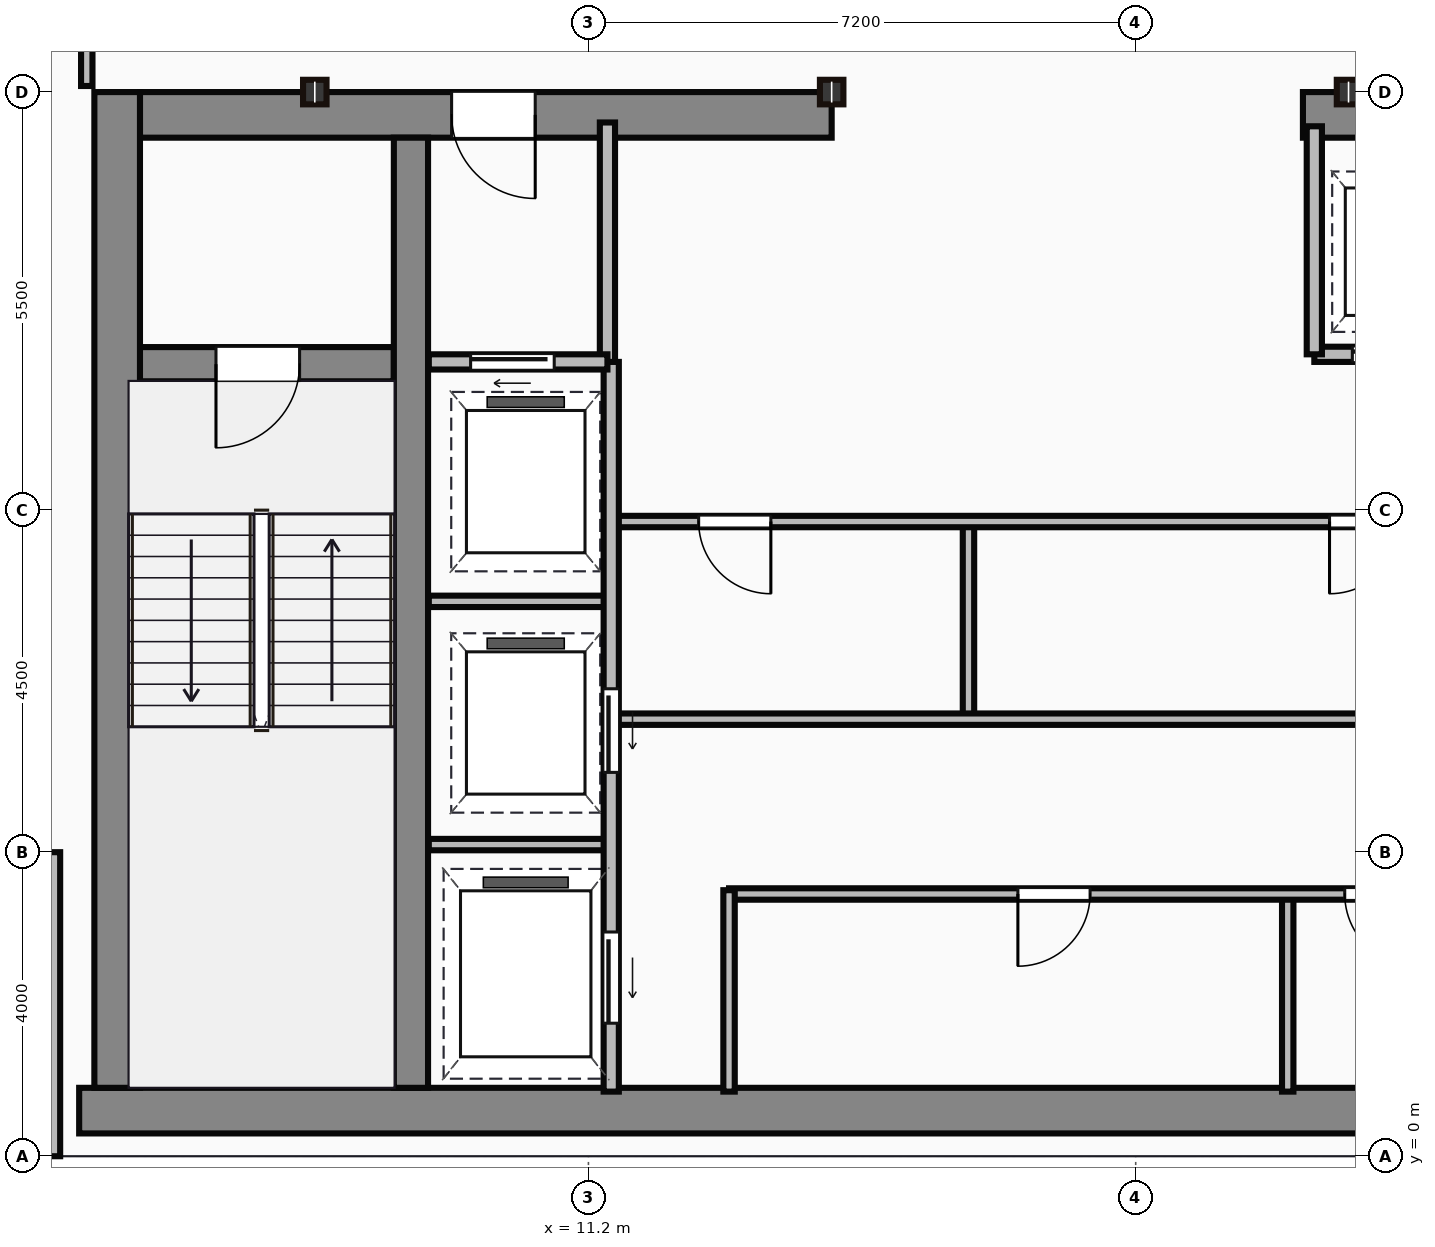
"""IFC4 building model, lengths in metres.
Left out: names, types, materials, properties, quantities, classifications, styles, units other than length and angle.
Written with IfcOpenShell. Run it as: python <this file> out.ifc"""

import sys

from ifc_helpers import new_model, si_unit, direction, frame, frame_2d, origin, origin_2d, place, context, subcontext, project, spatial, rectangle, i_section, extrude, source, transform, mapped, element, fill, save


model = new_model("IFC4")
c1 = context("Model", 3, precision=1e-05, world=origin(), true_north=direction((0.0, 1.0)))
c2 = subcontext(c1, "Body", "Model", "MODEL_VIEW")
j1 = project(units=[si_unit("LENGTHUNIT", "METRE"), si_unit("PLANEANGLEUNIT", "RADIAN")], contexts=[c1])
p1 = place(None, origin())
s1 = spatial("IfcSite", under=j1, at=p1, CompositionType="ELEMENT")
p2 = place(p1, origin())
s2 = spatial("IfcBuilding", under=s1, at=p2, CompositionType="ELEMENT")
p3 = place(p2, frame((0.0, 0.0, 228.75)))
s3 = spatial("IfcBuildingStorey", under=s2, at=p3, CompositionType="ELEMENT", Elevation=228.75)
m1 = source(origin(), c2, "Body", "SweptSolid", [
    extrude(rectangle(XDim=29.5, YDim=0.6, at=frame_2d((14.75, 0.0))), origin(), (0.0, 0.0, 1.0), 3.65),
])
p4 = place(p3, frame((4.5, 0.6, 0.0), z_axis=(0.0, 0.0, 1.0), x_axis=(1.0, 0.0, 0.0)))
e1 = element("IfcWall", 1, at=p4, inside=s3, PredefinedType="SHEAR", context=c2, shape_type="MappedRepresentation", body=[
    mapped(m1, transform((0.0, 0.0, 0.0))),
])
m2 = source(origin(), c2, "Body", "SweptSolid", [
    extrude(rectangle(XDim=13.1, YDim=0.6, at=frame_2d((6.55, 0.0))), origin(), (0.0, 0.0, 1.0), 3.65),
])
p5 = place(p3, frame((5.0, 0.9, 0.0), z_axis=(0.0, 0.0, 1.0), x_axis=(0.0, 1.0, 0.0)))
e2 = element("IfcWall", 2, at=p5, inside=s3, PredefinedType="SHEAR", context=c2, shape_type="MappedRepresentation", body=[
    mapped(m2, transform((0.0, 0.0, 0.0))),
])
m3 = source(origin(), c2, "Body", "SweptSolid", [
    extrude(rectangle(XDim=9.1, YDim=0.6, at=frame_2d((4.55, 0.0))), origin(), (0.0, 0.0, 1.0), 3.65),
])
p6 = place(p3, frame((5.3, 13.7, 0.0), z_axis=(0.0, 0.0, 1.0), x_axis=(1.0, 0.0, 0.0)))
e3 = element("IfcWall", 3, at=p6, inside=s3, PredefinedType="SHEAR", context=c2, shape_type="MappedRepresentation", body=[
    mapped(m3, transform((0.0, 0.0, 0.0))),
])
p7 = place(p6, frame((4.1, 0.0, 0.0)))
e4 = element("IfcOpeningElement", 4, at=p7, cuts=e3, PredefinedType="OPENING", context=c2, shape_type="SweptSolid", body=[
    extrude(rectangle(XDim=1.1, YDim=2.15, at=frame_2d((0.55, 1.075))), frame((0.0, 0.31, 0.0), z_axis=(0.0, -1.0, 0.0), x_axis=(1.0, 0.0, 0.0)), (0.0, 0.0, 1.0), 0.62),
])
m4 = source(origin(), c2, "Body", "SweptSolid", [
    extrude(rectangle(XDim=12.6, YDim=0.6, at=frame_2d((6.3, 0.0))), origin(), (0.0, 0.0, 1.0), 3.65),
])
p8 = place(p3, frame((20.6, 13.7, 0.0), z_axis=(0.0, 0.0, 1.0), x_axis=(1.0, 0.0, 0.0)))
e5 = element("IfcWall", 5, at=p8, inside=s3, PredefinedType="SHEAR", context=c2, shape_type="MappedRepresentation", body=[
    mapped(m4, transform((0.0, 0.0, 0.0))),
])
p9 = place(p8, frame((9.25, 0.0, 0.0)))
e6 = element("IfcOpeningElement", 6, at=p9, cuts=e5, PredefinedType="OPENING", context=c2, shape_type="SweptSolid", body=[
    extrude(rectangle(XDim=1.1, YDim=2.15, at=frame_2d((0.55, 1.075))), frame((0.0, 0.31, 0.0), z_axis=(0.0, -1.0, 0.0), x_axis=(1.0, 0.0, 0.0)), (0.0, 0.0, 1.0), 0.62),
])
m5 = source(origin(), c2, "Body", "SweptSolid", [
    extrude(rectangle(XDim=12.5, YDim=0.45, at=frame_2d((6.25, 0.0))), origin(), (0.0, 0.0, 1.0), 3.65),
])
p10 = place(p3, frame((8.865, 0.9, 0.0), z_axis=(0.0, 0.0, 1.0), x_axis=(0.0, 1.0, 0.0)))
e7 = element("IfcWall", 7, at=p10, inside=s3, PredefinedType="SHEAR", context=c2, shape_type="MappedRepresentation", body=[
    mapped(m5, transform((0.0, 0.0, 0.0))),
])
m6 = source(origin(), c2, "Body", "SweptSolid", [
    extrude(rectangle(XDim=3.39, YDim=0.45, at=frame_2d((1.695, 0.0))), origin(), (0.0, 0.0, 1.0), 3.65),
])
p11 = place(p3, frame((5.25, 10.42, 0.0), z_axis=(0.0, 0.0, 1.0), x_axis=(1.0, 0.0, 0.0)))
e8 = element("IfcWall", 8, at=p11, inside=s3, PredefinedType="SHEAR", context=c2, shape_type="MappedRepresentation", body=[
    mapped(m6, transform((0.0, 0.0, 0.0))),
])
p12 = place(p11, frame((1.05, 0.0, 0.0)))
e9 = element("IfcOpeningElement", 9, at=p12, cuts=e8, PredefinedType="OPENING", context=c2, shape_type="SweptSolid", body=[
    extrude(rectangle(XDim=1.1, YDim=2.15, at=frame_2d((0.55, 1.075))), frame((0.0, 0.235, 0.0), z_axis=(0.0, -1.0, 0.0), x_axis=(1.0, 0.0, 0.0)), (0.0, 0.0, 1.0), 0.47),
])
m7 = source(origin(), c2, "Body", "SweptSolid", [
    extrude(i_section(OverallWidth=0.309, OverallDepth=0.323, WebThickness=0.014, FlangeThickness=0.023, at=origin_2d()), origin(), (0.0, 0.0, 1.0), 3.65),
])
for number, where, z_axis, x_axis in (
    (10, (7.6, 14.0, 0.0), (0.0, 0.0, 1.0), (1.0, 0.0, 0.0)),
    (11, (14.4, 14.0, 0.0), (0.0, 0.0, 1.0), (1.0, 0.0, 0.0)),
    (12, (21.2, 14.0, 0.0), (0.0, 0.0, 1.0), (1.0, 0.0, 0.0)),
):
    element("IfcColumn", number, at=place(p3, frame(where, z_axis=z_axis, x_axis=x_axis)), inside=s3, PredefinedType="COLUMN", context=c2, shape_type="MappedRepresentation", body=[
        mapped(m7, transform((0.0, 0.0, 0.0))),
    ])
m8 = source(origin(), c2, "Body", "SweptSolid", [
    extrude(rectangle(XDim=4.0, YDim=0.25, at=frame_2d((2.0, 0.0))), origin(), (0.0, 0.0, 1.0), 3.4),
])
p13 = place(p3, frame((4.125, 4.0, 0.0), z_axis=(0.0, 0.0, 1.0), x_axis=(0.0, -1.0, 0.0)))
e13 = element("IfcWall", 13, at=p13, inside=s3, PredefinedType="STANDARD", context=c2, shape_type="MappedRepresentation", body=[
    mapped(m8, transform((0.0, 0.0, 0.0))),
])
m9 = source(origin(), c2, "Body", "SweptSolid", [
    extrude(rectangle(XDim=3.18, YDim=0.2, at=frame_2d((1.59, 0.0))), origin(), (0.0, 0.0, 1.0), 3.4),
])
p14 = place(p3, frame((11.45, 10.42, 0.0), z_axis=(0.0, 0.0, 1.0), x_axis=(0.0, 1.0, 0.0)))
e14 = element("IfcWall", 14, at=p14, inside=s3, PredefinedType="PARTITIONING", context=c2, shape_type="MappedRepresentation", body=[
    mapped(m9, transform((0.0, 0.0, 0.0))),
])
m10 = source(origin(), c2, "Body", "SweptSolid", [
    extrude(rectangle(XDim=2.35, YDim=0.2, at=frame_2d((1.175, 0.0))), origin(), (0.0, 0.0, 1.0), 3.4),
])
p15 = place(p3, frame((9.1, 10.45, 0.0), z_axis=(0.0, 0.0, 1.0), x_axis=(1.0, 0.0, 0.0)))
e15 = element("IfcWall", 15, at=p15, inside=s3, PredefinedType="PARTITIONING", context=c2, shape_type="MappedRepresentation", body=[
    mapped(m10, transform((0.0, 0.0, 0.0))),
])
p16 = place(p15, frame((0.55, 0.0, 0.0)))
e16 = element("IfcOpeningElement", 16, at=p16, cuts=e15, PredefinedType="OPENING", context=c2, shape_type="SweptSolid", body=[
    extrude(rectangle(XDim=1.1, YDim=2.15, at=frame_2d((0.55, 1.075))), frame((0.0, 0.11, 0.0), z_axis=(0.0, -1.0, 0.0), x_axis=(1.0, 0.0, 0.0)), (0.0, 0.0, 1.0), 0.22),
])
m11 = source(origin(), c2, "Body", "SweptSolid", [
    extrude(rectangle(XDim=9.6, YDim=0.2, at=frame_2d((4.8, 0.0))), origin(), (0.0, 0.0, 1.0), 3.4),
])
p17 = place(p3, frame((11.5, 0.85, 0.0), z_axis=(0.0, 0.0, 1.0), x_axis=(0.0, 1.0, 0.0)))
e17 = element("IfcWall", 17, at=p17, inside=s3, PredefinedType="PARTITIONING", context=c2, shape_type="MappedRepresentation", body=[
    mapped(m11, transform((0.0, 0.0, 0.0))),
])
p18 = place(p17, frame((4.2, 0.0, 0.0)))
e18 = element("IfcOpeningElement", 18, at=p18, cuts=e17, PredefinedType="OPENING", context=c2, shape_type="SweptSolid", body=[
    extrude(rectangle(XDim=1.1, YDim=2.15, at=frame_2d((0.55, 1.075))), frame((0.0, 0.11, 0.0), z_axis=(0.0, -1.0, 0.0), x_axis=(1.0, 0.0, 0.0)), (0.0, 0.0, 1.0), 0.22),
])
p19 = place(p17, frame((0.9, 0.0, 0.0)))
e19 = element("IfcOpeningElement", 19, at=p19, cuts=e17, PredefinedType="OPENING", context=c2, shape_type="SweptSolid", body=[
    extrude(rectangle(XDim=1.2, YDim=2.15, at=frame_2d((0.6, 1.075))), frame((0.0, 0.11, 0.0), z_axis=(0.0, -1.0, 0.0), x_axis=(1.0, 0.0, 0.0)), (0.0, 0.0, 1.0), 0.22),
])
m12 = source(origin(), c2, "Body", "SweptSolid", [
    extrude(rectangle(XDim=2.4, YDim=0.15, at=frame_2d((1.2, 0.0))), origin(), (0.0, 0.0, 1.0), 3.4),
])
for number, where, z_axis, x_axis in (
    (20, (9.1, 4.1, 0.0), (0.0, 0.0, 1.0), (1.0, 0.0, 0.0)),
    (21, (9.1, 7.3, 0.0), (0.0, 0.0, 1.0), (1.0, 0.0, 0.0)),
):
    element("IfcWall", number, at=place(p3, frame(where, z_axis=z_axis, x_axis=x_axis)), inside=s3, PredefinedType="PARTITIONING", context=c2, shape_type="MappedRepresentation", body=[
        mapped(m12, transform((0.0, 0.0, 0.0))),
    ])
m13 = source(origin(), c2, "Body", "SweptSolid", [
    extrude(rectangle(XDim=2.65, YDim=0.15, at=frame_2d((1.325, 0.0))), origin(), (0.0, 0.0, 1.0), 3.4),
])
p20 = place(p3, frame((13.05, 0.85, 0.0), z_axis=(0.0, 0.0, 1.0), x_axis=(0.0, 1.0, 0.0)))
e22 = element("IfcWall", 22, at=p20, inside=s3, PredefinedType="PARTITIONING", context=c2, shape_type="MappedRepresentation", body=[
    mapped(m13, transform((0.0, 0.0, 0.0))),
])
m14 = source(origin(), c2, "Body", "SweptSolid", [
    extrude(rectangle(XDim=10.35, YDim=0.15, at=frame_2d((5.175, 0.0))), origin(), (0.0, 0.0, 1.0), 3.4),
])
p21 = place(p3, frame((13.05, 3.45, 0.0), z_axis=(0.0, 0.0, 1.0), x_axis=(1.0, 0.0, 0.0)))
e23 = element("IfcWall", 23, at=p21, inside=s3, PredefinedType="PARTITIONING", context=c2, shape_type="MappedRepresentation", body=[
    mapped(m14, transform((0.0, 0.0, 0.0))),
])
p22 = place(p21, frame((3.8, 0.0, 0.0)))
e24 = element("IfcOpeningElement", 24, at=p22, cuts=e23, PredefinedType="OPENING", context=c2, shape_type="SweptSolid", body=[
    extrude(rectangle(XDim=0.95, YDim=2.15, at=frame_2d((0.475, 1.075))), frame((0.0, 0.085, 0.0), z_axis=(0.0, -1.0, 0.0), x_axis=(1.0, 0.0, 0.0)), (0.0, 0.0, 1.0), 0.17),
])
p23 = place(p21, frame((8.1, 0.0, 0.0)))
e25 = element("IfcOpeningElement", 25, at=p23, cuts=e23, PredefinedType="OPENING", context=c2, shape_type="SweptSolid", body=[
    extrude(rectangle(XDim=0.95, YDim=2.15, at=frame_2d((0.475, 1.075))), frame((0.0, 0.085, 0.0), z_axis=(0.0, -1.0, 0.0), x_axis=(1.0, 0.0, 0.0)), (0.0, 0.0, 1.0), 0.17),
])
m15 = source(origin(), c2, "Body", "SweptSolid", [
    extrude(rectangle(XDim=2.6, YDim=0.15, at=frame_2d((1.3, 0.0))), origin(), (0.0, 0.0, 1.0), 3.4),
])
p24 = place(p3, frame((20.4, 0.85, 0.0), z_axis=(0.0, 0.0, 1.0), x_axis=(0.0, 1.0, 0.0)))
e26 = element("IfcWall", 26, at=p24, inside=s3, PredefinedType="PARTITIONING", context=c2, shape_type="MappedRepresentation", body=[
    mapped(m15, transform((0.0, 0.0, 0.0))),
])
m16 = source(origin(), c2, "Body", "SweptSolid", [
    extrude(rectangle(XDim=11.85, YDim=0.15, at=frame_2d((5.925, 0.0))), origin(), (0.0, 0.0, 1.0), 3.4),
])
p25 = place(p3, frame((11.55, 5.75, 0.0), z_axis=(0.0, 0.0, 1.0), x_axis=(1.0, 0.0, 0.0)))
e27 = element("IfcWall", 27, at=p25, inside=s3, PredefinedType="PARTITIONING", context=c2, shape_type="MappedRepresentation", body=[
    mapped(m16, transform((0.0, 0.0, 0.0))),
])
p26 = place(p3, frame((11.55, 8.35, 0.0), z_axis=(0.0, 0.0, 1.0), x_axis=(1.0, 0.0, 0.0)))
e28 = element("IfcWall", 28, at=p26, inside=s3, PredefinedType="PARTITIONING", context=c2, shape_type="MappedRepresentation", body=[
    mapped(m16, transform((0.0, 0.0, 0.0))),
])
p27 = place(p26, frame((1.1, 0.0, 0.0)))
e29 = element("IfcOpeningElement", 29, at=p27, cuts=e28, PredefinedType="OPENING", context=c2, shape_type="SweptSolid", body=[
    extrude(rectangle(XDim=0.95, YDim=2.15, at=frame_2d((0.475, 1.075))), frame((0.0, 0.085, 0.0), z_axis=(0.0, -1.0, 0.0), x_axis=(1.0, 0.0, 0.0)), (0.0, 0.0, 1.0), 0.17),
])
p28 = place(p26, frame((9.4, 0.0, 0.0)))
e30 = element("IfcOpeningElement", 30, at=p28, cuts=e28, PredefinedType="OPENING", context=c2, shape_type="SweptSolid", body=[
    extrude(rectangle(XDim=0.95, YDim=2.15, at=frame_2d((0.475, 1.075))), frame((0.0, 0.085, 0.0), z_axis=(0.0, -1.0, 0.0), x_axis=(1.0, 0.0, 0.0)), (0.0, 0.0, 1.0), 0.17),
])
m17 = source(origin(), c2, "Body", "SweptSolid", [
    extrude(rectangle(XDim=2.5, YDim=0.15, at=frame_2d((1.25, 0.0))), origin(), (0.0, 0.0, 1.0), 3.4),
])
p29 = place(p3, frame((16.2, 5.8, 0.0), z_axis=(0.0, 0.0, 1.0), x_axis=(0.0, 1.0, 0.0)))
e31 = element("IfcWall", 31, at=p29, inside=s3, PredefinedType="PARTITIONING", context=c2, shape_type="MappedRepresentation", body=[
    mapped(m17, transform((0.0, 0.0, 0.0))),
])
m18 = source(origin(), c2, "Body", "SweptSolid", [
    extrude(rectangle(XDim=8.8, YDim=0.2, at=frame_2d((4.4, 0.0))), origin(), (0.0, 0.0, 1.0), 3.4),
])
p30 = place(p3, frame((20.75, 10.55, 0.0), z_axis=(0.0, 0.0, 1.0), x_axis=(1.0, 0.0, 0.0)))
e32 = element("IfcWall", 32, at=p30, inside=s3, PredefinedType="PARTITIONING", context=c2, shape_type="MappedRepresentation", body=[
    mapped(m18, transform((0.0, 0.0, 0.0))),
])
p31 = place(p30, frame((0.5, 0.0, 0.0)))
e33 = element("IfcOpeningElement", 33, at=p31, cuts=e32, PredefinedType="OPENING", context=c2, shape_type="SweptSolid", body=[
    extrude(rectangle(XDim=1.05, YDim=2.15, at=frame_2d((0.525, 1.075))), frame((0.0, 0.11, 0.0), z_axis=(0.0, -1.0, 0.0), x_axis=(1.0, 0.0, 0.0)), (0.0, 0.0, 1.0), 0.22),
])
p32 = place(p30, frame((2.6, 0.0, 0.0)))
e34 = element("IfcOpeningElement", 34, at=p32, cuts=e32, PredefinedType="OPENING", context=c2, shape_type="SweptSolid", body=[
    extrude(rectangle(XDim=1.05, YDim=2.15, at=frame_2d((0.525, 1.075))), frame((0.0, 0.11, 0.0), z_axis=(0.0, -1.0, 0.0), x_axis=(1.0, 0.0, 0.0)), (0.0, 0.0, 1.0), 0.22),
])
p33 = place(p30, frame((4.7, 0.0, 0.0)))
e35 = element("IfcOpeningElement", 35, at=p33, cuts=e32, PredefinedType="OPENING", context=c2, shape_type="SweptSolid", body=[
    extrude(rectangle(XDim=1.05, YDim=2.15, at=frame_2d((0.525, 1.075))), frame((0.0, 0.11, 0.0), z_axis=(0.0, -1.0, 0.0), x_axis=(1.0, 0.0, 0.0)), (0.0, 0.0, 1.0), 0.22),
])
p34 = place(p30, frame((6.8, 0.0, 0.0)))
e36 = element("IfcOpeningElement", 36, at=p34, cuts=e32, PredefinedType="OPENING", context=c2, shape_type="SweptSolid", body=[
    extrude(rectangle(XDim=1.05, YDim=2.15, at=frame_2d((0.525, 1.075))), frame((0.0, 0.11, 0.0), z_axis=(0.0, -1.0, 0.0), x_axis=(1.0, 0.0, 0.0)), (0.0, 0.0, 1.0), 0.22),
])
m19 = source(origin(), c2, "Body", "SweptSolid", [
    extrude(rectangle(XDim=3.0, YDim=0.2, at=frame_2d((1.5, 0.0))), origin(), (0.0, 0.0, 1.0), 3.4),
])
p35 = place(p3, frame((20.75, 10.55, 0.0), z_axis=(0.0, 0.0, 1.0), x_axis=(0.0, 1.0, 0.0)))
e37 = element("IfcWall", 37, at=p35, inside=s3, PredefinedType="PARTITIONING", context=c2, shape_type="MappedRepresentation", body=[
    mapped(m19, transform((0.0, 0.0, 0.0))),
])
m20 = source(origin(), c2, "Body", "SweptSolid", [
    extrude(rectangle(XDim=2.12, YDim=0.15, at=frame_2d((1.06, 0.0))), origin(), (0.0, 0.0, 1.0), 3.4),
])
p36 = place(p3, frame((4.6, 14.08, 0.0), z_axis=(0.0, 0.0, 1.0), x_axis=(0.0, 1.0, 0.0)))
e38 = element("IfcWall", 38, at=p36, inside=s3, PredefinedType="PARTITIONING", context=c2, shape_type="MappedRepresentation", body=[
    mapped(m20, transform((0.0, 0.0, 0.0))),
])
m21 = source(origin(), c2, "Body", "SweptSolid", [
    extrude(rectangle(XDim=1.1, YDim=2.15, at=frame_2d((0.55, 1.075))), frame((0.0, 0.025, 0.0), z_axis=(0.0, -1.0, 0.0), x_axis=(1.0, 0.0, 0.0)), (0.0, 0.0, 1.0), 0.05),
])
p37 = place(p12, frame((1.1, 0.0, 0.0), z_axis=(0.0, 0.0, 1.0), x_axis=(-1.0, 0.0, 0.0)))
e39 = element("IfcDoor", 39, at=p37, inside=s3, OperationType="SINGLE_SWING_LEFT", PredefinedType="DOOR", context=c2, shape_type="MappedRepresentation", body=[
    mapped(m21, transform((0.0, 0.0, 0.0))),
])
fill(e9, e39)
p38 = place(p7, origin())
e40 = element("IfcDoor", 40, at=p38, inside=s3, OperationType="SINGLE_SWING_RIGHT", PredefinedType="DOOR", context=c2, shape_type="MappedRepresentation", body=[
    mapped(m21, transform((0.0, 0.0, 0.0))),
])
fill(e4, e40)
p39 = place(p16, origin())
e41 = element("IfcDoor", 41, at=p39, inside=s3, OperationType="SLIDING_TO_LEFT", PredefinedType="DOOR", context=c2, shape_type="MappedRepresentation", body=[
    mapped(m21, transform((0.0, 0.0, 0.0))),
])
fill(e16, e41)
p40 = place(p18, frame((1.1, 0.0, 0.0), z_axis=(0.0, 0.0, 1.0), x_axis=(-1.0, 0.0, 0.0)))
e42 = element("IfcDoor", 42, at=p40, inside=s3, OperationType="SLIDING_TO_LEFT", PredefinedType="DOOR", context=c2, shape_type="MappedRepresentation", body=[
    mapped(m21, transform((0.0, 0.0, 0.0))),
])
fill(e18, e42)
m22 = source(origin(), c2, "Body", "SweptSolid", [
    extrude(rectangle(XDim=1.2, YDim=2.15, at=frame_2d((0.6, 1.075))), frame((0.0, 0.025, 0.0), z_axis=(0.0, -1.0, 0.0), x_axis=(1.0, 0.0, 0.0)), (0.0, 0.0, 1.0), 0.05),
])
p41 = place(p19, frame((1.2, 0.0, 0.0), z_axis=(0.0, 0.0, 1.0), x_axis=(-1.0, 0.0, 0.0)))
e43 = element("IfcDoor", 43, at=p41, inside=s3, OperationType="SLIDING_TO_LEFT", PredefinedType="DOOR", context=c2, shape_type="MappedRepresentation", body=[
    mapped(m22, transform((0.0, 0.0, 0.0))),
])
fill(e19, e43)
m23 = source(origin(), c2, "Body", "SweptSolid", [
    extrude(rectangle(XDim=0.95, YDim=2.15, at=frame_2d((0.475, 1.075))), frame((0.0, 0.025, 0.0), z_axis=(0.0, -1.0, 0.0), x_axis=(1.0, 0.0, 0.0)), (0.0, 0.0, 1.0), 0.05),
])
p42 = place(p22, origin())
e44 = element("IfcDoor", 44, at=p42, inside=s3, OperationType="SINGLE_SWING_LEFT", PredefinedType="DOOR", context=c2, shape_type="MappedRepresentation", body=[
    mapped(m23, transform((0.0, 0.0, 0.0))),
])
fill(e24, e44)
p43 = place(p23, origin())
e45 = element("IfcDoor", 45, at=p43, inside=s3, OperationType="SINGLE_SWING_RIGHT", PredefinedType="DOOR", context=c2, shape_type="MappedRepresentation", body=[
    mapped(m23, transform((0.0, 0.0, 0.0))),
])
fill(e25, e45)
p44 = place(p27, origin())
e46 = element("IfcDoor", 46, at=p44, inside=s3, OperationType="SINGLE_SWING_RIGHT", PredefinedType="DOOR", context=c2, shape_type="MappedRepresentation", body=[
    mapped(m23, transform((0.0, 0.0, 0.0))),
])
fill(e29, e46)
p45 = place(p28, origin())
e47 = element("IfcDoor", 47, at=p45, inside=s3, OperationType="SINGLE_SWING_LEFT", PredefinedType="DOOR", context=c2, shape_type="MappedRepresentation", body=[
    mapped(m23, transform((0.0, 0.0, 0.0))),
])
fill(e30, e47)
m24 = source(origin(), c2, "Body", "SweptSolid", [
    extrude(rectangle(XDim=1.05, YDim=2.15, at=frame_2d((0.525, 1.075))), frame((0.0, 0.025, 0.0), z_axis=(0.0, -1.0, 0.0), x_axis=(1.0, 0.0, 0.0)), (0.0, 0.0, 1.0), 0.05),
])
p46 = place(p31, frame((1.05, 0.0, 0.0), z_axis=(0.0, 0.0, 1.0), x_axis=(-1.0, 0.0, 0.0)))
e48 = element("IfcDoor", 48, at=p46, inside=s3, OperationType="SLIDING_TO_LEFT", PredefinedType="DOOR", context=c2, shape_type="MappedRepresentation", body=[
    mapped(m24, transform((0.0, 0.0, 0.0))),
])
fill(e33, e48)
save(model, sys.argv[1])
